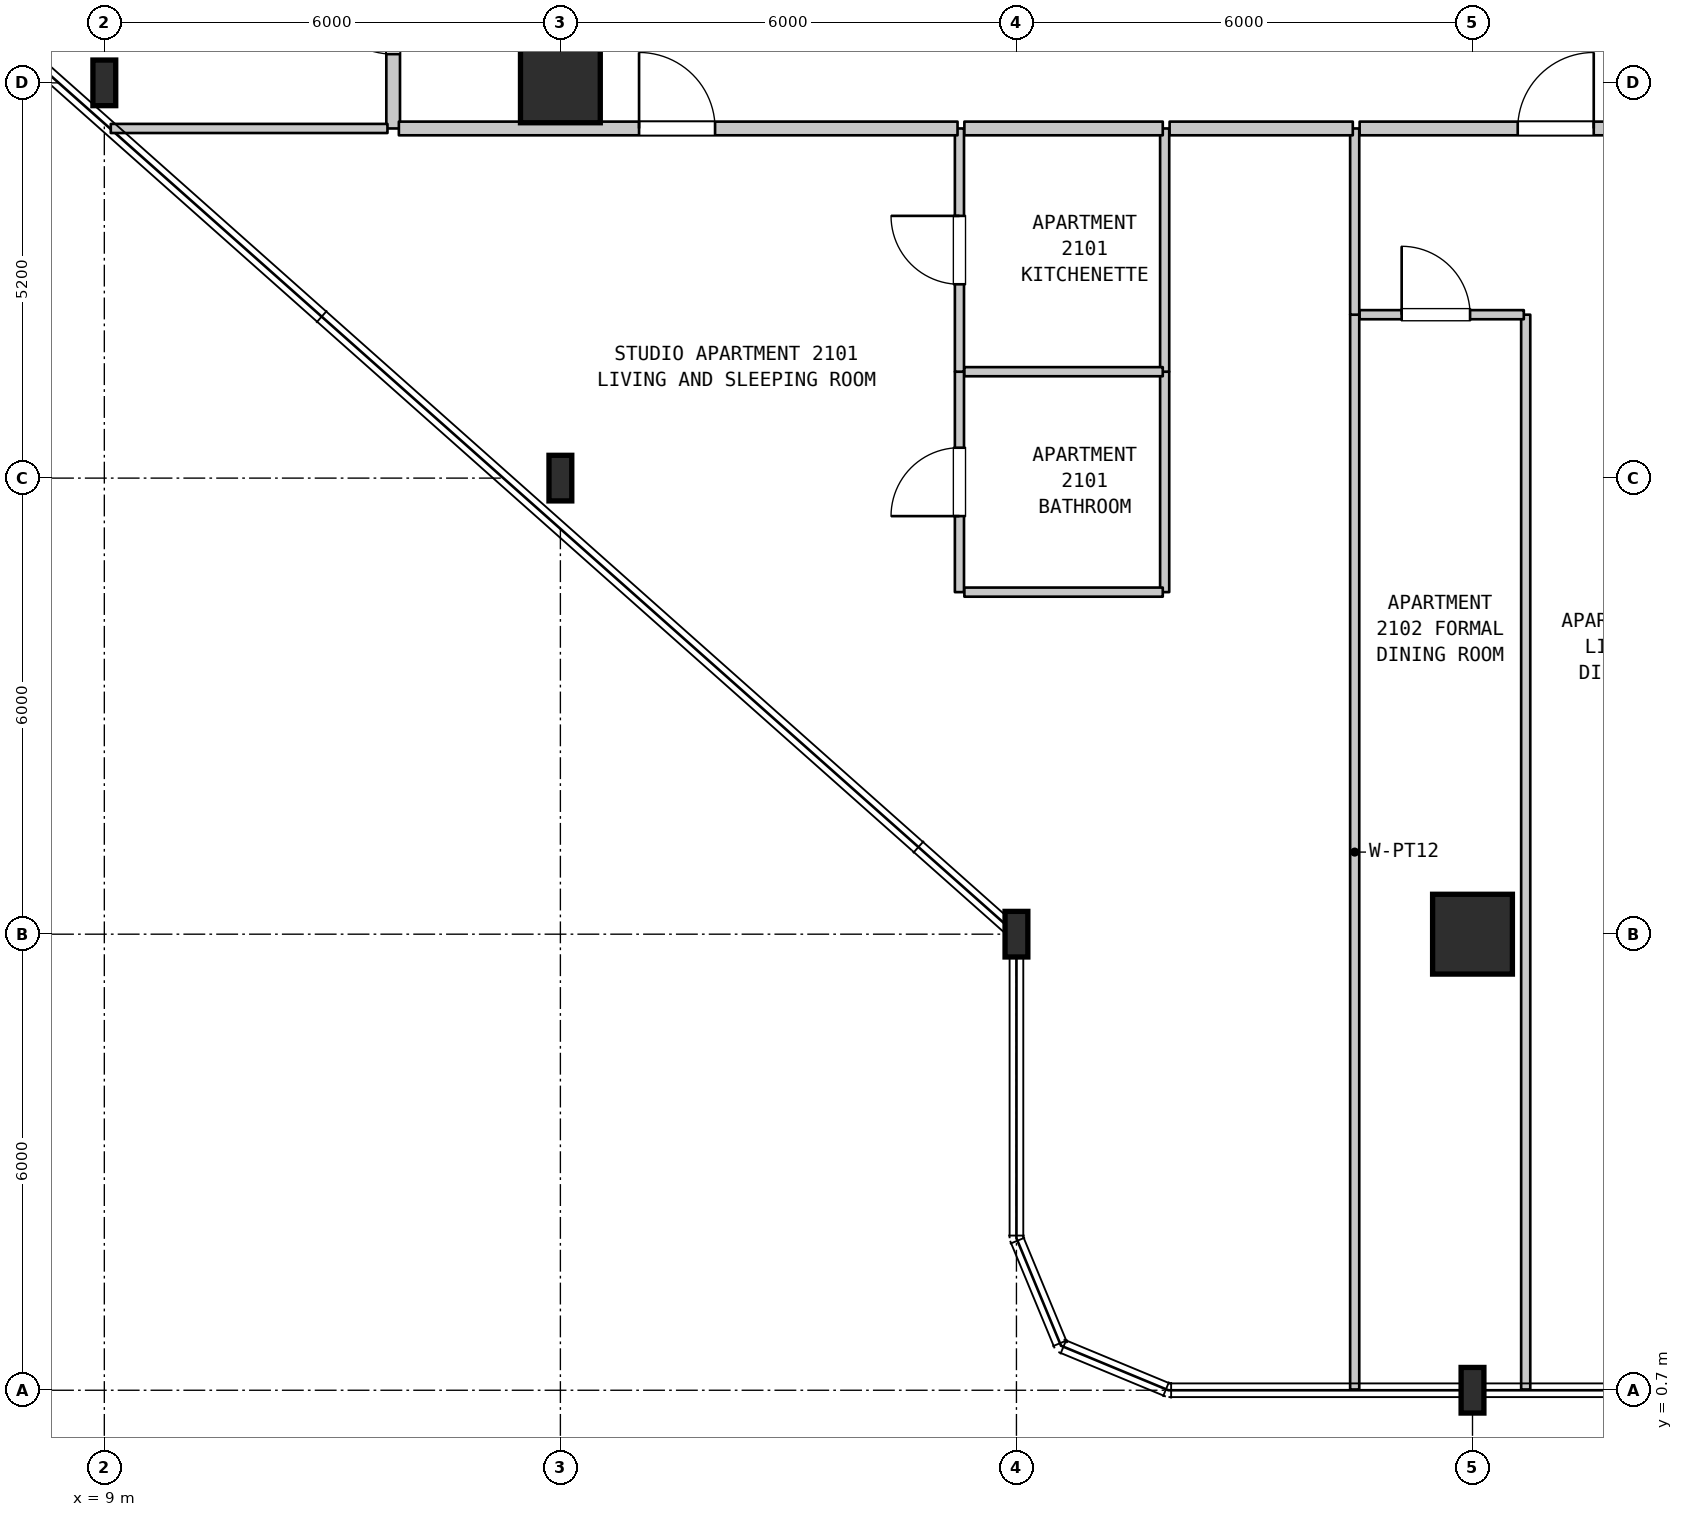
"""IFC4 building model, lengths in metres.
Left out: names, types, materials, properties, quantities, classifications, styles, units other than length and angle.
Written with IfcOpenShell. Run it as: python <this file> out.ifc"""

import sys

from ifc_helpers import new_model, si_unit, direction, frame, frame_2d, origin, origin_2d, place, context, subcontext, project, spatial, rectangle, i_section, extrude, element, fill, save


model = new_model("IFC4")
c1 = context("Model", 3, precision=1e-05, world=origin(), true_north=direction((0.0, 1.0)))
c2 = subcontext(c1, "Body", "Model", "MODEL_VIEW")
j1 = project(units=[si_unit("LENGTHUNIT", "METRE"), si_unit("PLANEANGLEUNIT", "RADIAN")], contexts=[c1])
p1 = place(None, origin())
s1 = spatial("IfcSite", under=j1, at=p1, CompositionType="ELEMENT")
p2 = place(p1, origin())
s2 = spatial("IfcBuilding", under=s1, at=p2, CompositionType="ELEMENT")
p3 = place(p2, frame((0.0, 0.0, 90.9)))
s3 = spatial("IfcBuildingStorey", under=s2, at=p3, CompositionType="ELEMENT", Elevation=90.9)
for number, where, z_axis, x_axis in (
    (1, (9.0, 17.9, 0.0), (0.0, 0.0, 1.0), (1.0, 0.0, 0.0)),
    (2, (15.0, 12.7, 0.0), (0.0, 0.0, 1.0), (1.0, 0.0, 0.0)),
):
    element("IfcColumn", number, at=place(p3, frame(where, z_axis=z_axis, x_axis=x_axis)), inside=s3, PredefinedType="COLUMN", context=c2, shape_type="SweptSolid", body=[
        extrude(i_section(OverallWidth=0.3, OverallDepth=0.6, WebThickness=0.015, FlangeThickness=0.03, FilletRadius=0.027, at=origin_2d()), origin(), (0.0, 0.0, 1.0), 3.7),
    ])
p4 = place(p3, frame((15.0, 17.9, 0.0), z_axis=(0.0, 0.0, 1.0), x_axis=(1.0, 0.0, 0.0)))
e3 = element("IfcColumn", 3, at=p4, inside=s3, PredefinedType="COLUMN", context=c2, shape_type="SweptSolid", body=[
    extrude(rectangle(XDim=1.05, YDim=1.05, at=origin_2d()), origin(), (0.0, 0.0, 1.0), 3.7),
])
for number, where, z_axis, x_axis in (
    (4, (21.0, 6.7, 0.0), (0.0, 0.0, 1.0), (1.0, 0.0, 0.0)),
    (5, (27.0, 0.7, 0.0), (0.0, 0.0, 1.0), (1.0, 0.0, 0.0)),
):
    element("IfcColumn", number, at=place(p3, frame(where, z_axis=z_axis, x_axis=x_axis)), inside=s3, PredefinedType="COLUMN", context=c2, shape_type="SweptSolid", body=[
        extrude(i_section(OverallWidth=0.3, OverallDepth=0.6, WebThickness=0.015, FlangeThickness=0.03, FilletRadius=0.027, at=origin_2d()), origin(), (0.0, 0.0, 1.0), 3.7),
    ])
p5 = place(p3, frame((27.0, 6.7, 0.0), z_axis=(0.0, 0.0, 1.0), x_axis=(1.0, 0.0, 0.0)))
e6 = element("IfcColumn", 6, at=p5, inside=s3, PredefinedType="COLUMN", context=c2, shape_type="SweptSolid", body=[
    extrude(rectangle(XDim=1.05, YDim=1.05, at=origin_2d()), origin(), (0.0, 0.0, 1.0), 3.7),
])
p6 = place(p3, frame((12.8, 17.3, 0.0), z_axis=(0.0, 0.0, 1.0), x_axis=(0.0, 1.0, 0.0)))
e7 = element("IfcWall", 7, at=p6, inside=s3, PredefinedType="STANDARD", context=c2, shape_type="SweptSolid", body=[
    extrude(rectangle(XDim=3.1, YDim=0.18, at=frame_2d((1.55, 0.0))), origin(), (0.0, 0.0, 1.0), 3.385),
])
p7 = place(p6, frame((0.978, 0.0, 0.0)))
e8 = element("IfcOpeningElement", 8, at=p7, cuts=e7, PredefinedType="OPENING", context=c2, shape_type="SweptSolid", body=[
    extrude(rectangle(XDim=1.0, YDim=2.15, at=frame_2d((0.5, 1.075))), frame((0.0, 0.1, 0.0), z_axis=(0.0, -1.0, 0.0), x_axis=(1.0, 0.0, 0.0)), (0.0, 0.0, 1.0), 0.2),
])
p8 = place(p3, frame((20.25, 11.2, 0.0), z_axis=(0.0, 0.0, 1.0), x_axis=(0.0, 1.0, 0.0)))
e9 = element("IfcWall", 9, at=p8, inside=s3, PredefinedType="PARTITIONING", context=c2, shape_type="SweptSolid", body=[
    extrude(rectangle(XDim=2.9, YDim=0.12, at=frame_2d((1.45, 0.0))), origin(), (0.0, 0.0, 1.0), 3.385),
])
p9 = place(p8, frame((1.0, 0.0, 0.0)))
e10 = element("IfcOpeningElement", 10, at=p9, cuts=e9, PredefinedType="OPENING", context=c2, shape_type="SweptSolid", body=[
    extrude(rectangle(XDim=0.9, YDim=2.1, at=frame_2d((0.45, 1.05))), frame((0.0, 0.07, 0.0), z_axis=(0.0, -1.0, 0.0), x_axis=(1.0, 0.0, 0.0)), (0.0, 0.0, 1.0), 0.14),
])
p10 = place(p3, frame((20.25, 14.1, 0.0), z_axis=(0.0, 0.0, 1.0), x_axis=(0.0, 1.0, 0.0)))
e11 = element("IfcWall", 11, at=p10, inside=s3, PredefinedType="PARTITIONING", context=c2, shape_type="SweptSolid", body=[
    extrude(rectangle(XDim=3.2, YDim=0.12, at=frame_2d((1.6, 0.0))), origin(), (0.0, 0.0, 1.0), 3.385),
])
p11 = place(p10, frame((1.15, 0.0, 0.0)))
e12 = element("IfcOpeningElement", 12, at=p11, cuts=e11, PredefinedType="OPENING", context=c2, shape_type="SweptSolid", body=[
    extrude(rectangle(XDim=0.9, YDim=2.15, at=frame_2d((0.45, 1.075))), frame((0.0, 0.07, 0.0), z_axis=(0.0, -1.0, 0.0), x_axis=(1.0, 0.0, 0.0)), (0.0, 0.0, 1.0), 0.14),
])
p12 = place(p3, frame((22.95, 11.2, 0.0), z_axis=(0.0, 0.0, 1.0), x_axis=(0.0, 1.0, 0.0)))
e13 = element("IfcWall", 13, at=p12, inside=s3, PredefinedType="PARTITIONING", context=c2, shape_type="SweptSolid", body=[
    extrude(rectangle(XDim=2.9, YDim=0.12, at=frame_2d((1.45, 0.0))), origin(), (0.0, 0.0, 1.0), 3.385),
])
p13 = place(p3, frame((22.95, 14.1, 0.0), z_axis=(0.0, 0.0, 1.0), x_axis=(0.0, 1.0, 0.0)))
e14 = element("IfcWall", 14, at=p13, inside=s3, PredefinedType="PARTITIONING", context=c2, shape_type="SweptSolid", body=[
    extrude(rectangle(XDim=3.2, YDim=0.12, at=frame_2d((1.6, 0.0))), origin(), (0.0, 0.0, 1.0), 3.385),
])
p14 = place(p3, frame((25.45, 0.71, 0.0), z_axis=(0.0, 0.0, 1.0), x_axis=(0.0, 1.0, 0.0)))
e15 = element("IfcWall", 15, at=p14, inside=s3, PredefinedType="PARTITIONING", context=c2, shape_type="SweptSolid", body=[
    extrude(rectangle(XDim=14.14, YDim=0.12, at=frame_2d((7.07, 0.0))), origin(), (0.0, 0.0, 1.0), 3.385),
])
p15 = place(p3, frame((25.45, 14.85, 0.0), z_axis=(0.0, 0.0, 1.0), x_axis=(0.0, 1.0, 0.0)))
e16 = element("IfcWall", 16, at=p15, inside=s3, PredefinedType="PARTITIONING", context=c2, shape_type="SweptSolid", body=[
    extrude(rectangle(XDim=2.45, YDim=0.12, at=frame_2d((1.225, 0.0))), origin(), (0.0, 0.0, 1.0), 3.385),
])
p16 = place(p3, frame((27.7, 0.71, 0.0), z_axis=(0.0, 0.0, 1.0), x_axis=(0.0, 1.0, 0.0)))
e17 = element("IfcWall", 17, at=p16, inside=s3, PredefinedType="PARTITIONING", context=c2, shape_type="SweptSolid", body=[
    extrude(rectangle(XDim=14.14, YDim=0.12, at=frame_2d((7.07, 0.0))), origin(), (0.0, 0.0, 1.0), 3.385),
])
for number, where, z_axis, x_axis in (
    (18, (20.315, 11.2, 0.0), (0.0, 0.0, 1.0), (1.0, 0.0, 0.0)),
    (19, (20.315, 14.1, 0.0), (0.0, 0.0, 1.0), (1.0, 0.0, 0.0)),
):
    element("IfcWall", number, at=place(p3, frame(where, z_axis=z_axis, x_axis=x_axis)), inside=s3, PredefinedType="PARTITIONING", context=c2, shape_type="SweptSolid", body=[
        extrude(rectangle(XDim=2.61, YDim=0.12, at=frame_2d((1.305, 0.0))), origin(), (0.0, 0.0, 1.0), 3.385),
    ])
p17 = place(p3, frame((25.515, 14.85, 0.0), z_axis=(0.0, 0.0, 1.0), x_axis=(1.0, 0.0, 0.0)))
e20 = element("IfcWall", 20, at=p17, inside=s3, PredefinedType="PARTITIONING", context=c2, shape_type="SweptSolid", body=[
    extrude(rectangle(XDim=2.16, YDim=0.12, at=frame_2d((1.08, 0.0))), origin(), (0.0, 0.0, 1.0), 3.385),
])
p18 = place(p17, frame((0.553, 0.0, 0.0)))
e21 = element("IfcOpeningElement", 21, at=p18, cuts=e20, PredefinedType="OPENING", context=c2, shape_type="SweptSolid", body=[
    extrude(rectangle(XDim=0.9, YDim=2.15, at=frame_2d((0.45, 1.075))), frame((0.0, 0.07, 0.0), z_axis=(0.0, -1.0, 0.0), x_axis=(1.0, 0.0, 0.0)), (0.0, 0.0, 1.0), 0.14),
])
p19 = place(p3, frame((9.085, 17.3, 0.0), z_axis=(0.0, 0.0, 1.0), x_axis=(1.0, 0.0, 0.0)))
e22 = element("IfcWall", 22, at=p19, inside=s3, PredefinedType="PARTITIONING", context=c2, shape_type="SweptSolid", body=[
    extrude(rectangle(XDim=3.64, YDim=0.12, at=frame_2d((1.82, 0.0))), origin(), (0.0, 0.0, 1.0), 3.385),
])
p20 = place(p3, frame((12.875, 17.3, 0.0), z_axis=(0.0, 0.0, 1.0), x_axis=(1.0, 0.0, 0.0)))
e23 = element("IfcWall", 23, at=p20, inside=s3, PredefinedType="STANDARD", context=c2, shape_type="SweptSolid", body=[
    extrude(rectangle(XDim=7.35, YDim=0.18, at=frame_2d((3.675, 0.0))), origin(), (0.0, 0.0, 1.0), 3.385),
])
p21 = place(p20, frame((3.16, 0.0, 0.0)))
e24 = element("IfcOpeningElement", 24, at=p21, cuts=e23, PredefinedType="OPENING", context=c2, shape_type="SweptSolid", body=[
    extrude(rectangle(XDim=1.0, YDim=2.15, at=frame_2d((0.5, 1.075))), frame((0.0, 0.1, 0.0), z_axis=(0.0, -1.0, 0.0), x_axis=(1.0, 0.0, 0.0)), (0.0, 0.0, 1.0), 0.2),
])
p22 = place(p3, frame((20.315, 17.3, 0.0), z_axis=(0.0, 0.0, 1.0), x_axis=(1.0, 0.0, 0.0)))
e25 = element("IfcWall", 25, at=p22, inside=s3, PredefinedType="STANDARD", context=c2, shape_type="SweptSolid", body=[
    extrude(rectangle(XDim=2.61, YDim=0.18, at=frame_2d((1.305, 0.0))), origin(), (0.0, 0.0, 1.0), 3.385),
])
p23 = place(p3, frame((23.015, 17.3, 0.0), z_axis=(0.0, 0.0, 1.0), x_axis=(1.0, 0.0, 0.0)))
e26 = element("IfcWall", 26, at=p23, inside=s3, PredefinedType="STANDARD", context=c2, shape_type="SweptSolid", body=[
    extrude(rectangle(XDim=2.41, YDim=0.18, at=frame_2d((1.205, 0.0))), origin(), (0.0, 0.0, 1.0), 3.385),
])
p24 = place(p3, frame((25.515, 17.3, 0.0), z_axis=(0.0, 0.0, 1.0), x_axis=(1.0, 0.0, 0.0)))
e27 = element("IfcWall", 27, at=p24, inside=s3, PredefinedType="STANDARD", context=c2, shape_type="SweptSolid", body=[
    extrude(rectangle(XDim=5.095, YDim=0.18, at=frame_2d((2.548, 0.0))), origin(), (0.0, 0.0, 1.0), 3.385),
])
p25 = place(p24, frame((2.08, 0.0, 0.0)))
e28 = element("IfcOpeningElement", 28, at=p25, cuts=e27, PredefinedType="OPENING", context=c2, shape_type="SweptSolid", body=[
    extrude(rectangle(XDim=1.0, YDim=2.15, at=frame_2d((0.5, 1.075))), frame((0.0, 0.1, 0.0), z_axis=(0.0, -1.0, 0.0), x_axis=(1.0, 0.0, 0.0)), (0.0, 0.0, 1.0), 0.2),
])
p26 = place(p7, origin())
e29 = element("IfcDoor", 29, at=p26, inside=s3, OperationType="SINGLE_SWING_RIGHT", PredefinedType="DOOR", context=c2, shape_type="SweptSolid", body=[
    extrude(rectangle(XDim=1.0, YDim=2.15, at=frame_2d((0.5, 1.075))), frame((0.0, 0.025, 0.0), z_axis=(0.0, -1.0, 0.0), x_axis=(1.0, 0.0, 0.0)), (0.0, 0.0, 1.0), 0.05),
])
fill(e8, e29)
p27 = place(p9, origin())
e30 = element("IfcDoor", 30, at=p27, inside=s3, OperationType="SINGLE_SWING_LEFT", PredefinedType="DOOR", context=c2, shape_type="SweptSolid", body=[
    extrude(rectangle(XDim=0.9, YDim=2.1, at=frame_2d((0.45, 1.05))), frame((0.0, 0.025, 0.0), z_axis=(0.0, -1.0, 0.0), x_axis=(1.0, 0.0, 0.0)), (0.0, 0.0, 1.0), 0.05),
])
fill(e10, e30)
p28 = place(p11, origin())
e31 = element("IfcDoor", 31, at=p28, inside=s3, OperationType="SINGLE_SWING_RIGHT", PredefinedType="DOOR", context=c2, shape_type="SweptSolid", body=[
    extrude(rectangle(XDim=0.9, YDim=2.15, at=frame_2d((0.45, 1.075))), frame((0.0, 0.025, 0.0), z_axis=(0.0, -1.0, 0.0), x_axis=(1.0, 0.0, 0.0)), (0.0, 0.0, 1.0), 0.05),
])
fill(e12, e31)
p29 = place(p18, origin())
e32 = element("IfcDoor", 32, at=p29, inside=s3, OperationType="SINGLE_SWING_LEFT", PredefinedType="DOOR", context=c2, shape_type="SweptSolid", body=[
    extrude(rectangle(XDim=0.9, YDim=2.15, at=frame_2d((0.45, 1.075))), frame((0.0, 0.025, 0.0), z_axis=(0.0, -1.0, 0.0), x_axis=(1.0, 0.0, 0.0)), (0.0, 0.0, 1.0), 0.05),
])
fill(e21, e32)
p30 = place(p21, origin())
e33 = element("IfcDoor", 33, at=p30, inside=s3, OperationType="SINGLE_SWING_LEFT", PredefinedType="DOOR", context=c2, shape_type="SweptSolid", body=[
    extrude(rectangle(XDim=1.0, YDim=2.15, at=frame_2d((0.5, 1.075))), frame((0.0, 0.025, 0.0), z_axis=(0.0, -1.0, 0.0), x_axis=(1.0, 0.0, 0.0)), (0.0, 0.0, 1.0), 0.05),
])
fill(e24, e33)
p31 = place(p25, origin())
e34 = element("IfcDoor", 34, at=p31, inside=s3, OperationType="SINGLE_SWING_RIGHT", PredefinedType="DOOR", context=c2, shape_type="SweptSolid", body=[
    extrude(rectangle(XDim=1.0, YDim=2.15, at=frame_2d((0.5, 1.075))), frame((0.0, 0.025, 0.0), z_axis=(0.0, -1.0, 0.0), x_axis=(1.0, 0.0, 0.0)), (0.0, 0.0, 1.0), 0.05),
])
fill(e28, e34)
save(model, sys.argv[1])
